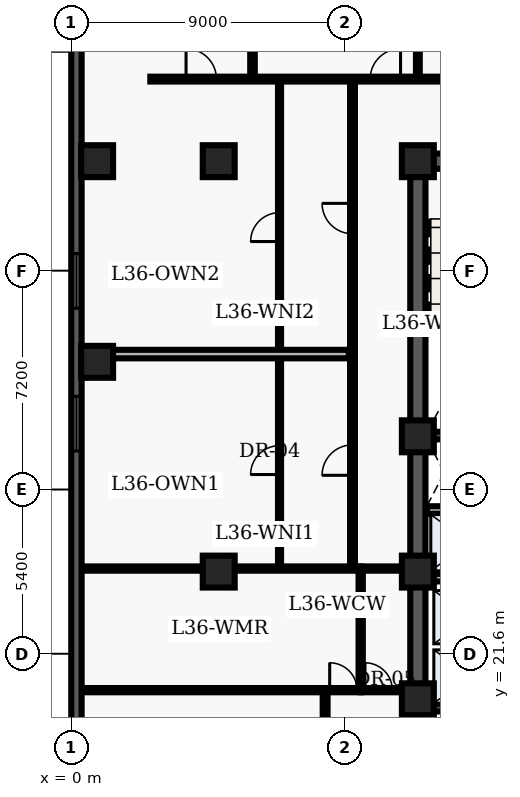
"""IFC4 building model, lengths in metres.
Left out: names, types, materials, properties, quantities, classifications, styles, units other than length and angle.
Written with IfcOpenShell. Run it as: python <this file> out.ifc"""

import sys

from ifc_helpers import new_model, entity, si_unit, converted_unit, direction, frame, origin_with_axes, origin_2d_with_axis, place, context, subcontext, project, spatial, polyline, rectangle, outline, extrude, element, fill, save


model = new_model("IFC4")
c1 = context("Model", 3, precision=1e-05, world=origin_with_axes(), true_north=direction((0.0, 1.0)))
c2 = subcontext(c1, "Body", "Model", "MODEL_VIEW")
j1 = project(units=[si_unit("LENGTHUNIT", "METRE"), converted_unit("PLANEANGLEUNIT", "DEGREE", entity("IfcPlaneAngleMeasure", 0.017), si_unit("PLANEANGLEUNIT", "RADIAN"), dimensions=[0, 0, 0, 0, 0, 0, 0])], contexts=[c1])
p1 = place(None, origin_with_axes())
s1 = spatial("IfcSite", under=j1, at=p1, CompositionType="ELEMENT")
p2 = place(p1, origin_with_axes())
s2 = spatial("IfcBuilding", under=s1, at=p2, CompositionType="ELEMENT")
p3 = place(p2, frame((0.0, 0.0, 148.5), z_axis=(0.0, 0.0, 1.0), x_axis=(1.0, 0.0, 0.0)))
s3 = spatial("IfcBuildingStorey", under=s2, at=p3, CompositionType="ELEMENT", Elevation=148.5)
p4 = place(p3, frame((11.4, 10.8, 0.0), z_axis=(0.0, 0.0, 1.0), x_axis=(0.0, 1.0, 0.0)))
e1 = element("IfcWall", 1, at=p4, inside=s3, PredefinedType="SHEAR", context=c2, shape_type="SweptSolid", body=[
    extrude(outline(polyline([(0.0, -0.25), (27.0, -0.25), (27.0, 0.25), (0.0, 0.25), (0.0, -0.25)])), origin_with_axes(), (0.0, 0.0, 1.0), 3.66),
])
p5 = place(p3, frame((11.4, 37.8, 0.0), z_axis=(0.0, 0.0, 1.0), x_axis=(1.0, 0.0, 0.0)))
e2 = element("IfcWall", 2, at=p5, inside=s3, PredefinedType="SHEAR", context=c2, shape_type="SweptSolid", body=[
    extrude(outline(polyline([(0.0, -0.25), (7.2, -0.25), (7.2, 0.25), (0.0, 0.25), (0.0, -0.25)])), origin_with_axes(), (0.0, 0.0, 1.0), 3.66),
])
p6 = place(p5, frame((2.625, 0.0, 0.0), z_axis=(0.0, 0.0, 1.0), x_axis=(1.0, 0.0, 0.0)))
e3 = element("IfcOpeningElement", 3, at=p6, cuts=e2, PredefinedType="OPENING", context=c2, shape_type="SweptSolid", body=[
    extrude(rectangle(XDim=1.05, YDim=0.52, at=origin_2d_with_axis()), origin_with_axes(), (0.0, 0.0, 1.0), 2.15),
])
for number, where, z_axis, x_axis in (
    (4, (11.65, 19.825, 0.0), (0.0, 0.0, 1.0), (1.0, 0.0, 0.0)),
    (5, (11.65, 28.775, 0.0), (0.0, 0.0, 1.0), (1.0, 0.0, 0.0)),
):
    element("IfcWall", number, at=place(p3, frame(where, z_axis=z_axis, x_axis=x_axis)), inside=s3, PredefinedType="SHEAR", context=c2, shape_type="SweptSolid", body=[
        extrude(outline(polyline([(0.0, -0.125), (6.7, -0.125), (6.7, 0.125), (0.0, 0.125), (0.0, -0.125)])), origin_with_axes(), (0.0, 0.0, 1.0), 3.66),
    ])
p7 = place(p3, frame((11.7, 24.1, 0.0), z_axis=(0.0, 0.0, 1.0), x_axis=(1.0, 0.0, 0.0)))
e6 = element("IfcWall", 6, at=p7, inside=s3, PredefinedType="SOLIDWALL", context=c2, shape_type="SweptSolid", body=[
    extrude(outline(polyline([(0.0, -0.125), (6.6, -0.125), (6.6, 0.125), (0.0, 0.125), (0.0, -0.125)])), origin_with_axes(), (0.0, 0.0, 1.0), 2.7),
])
p8 = place(p7, frame((3.75, 0.0, 0.0), z_axis=(0.0, 0.0, 1.0), x_axis=(1.0, 0.0, 0.0)))
e7 = element("IfcOpeningElement", 7, at=p8, cuts=e6, PredefinedType="OPENING", context=c2, shape_type="SweptSolid", body=[
    extrude(rectangle(XDim=0.9, YDim=0.27, at=origin_2d_with_axis()), origin_with_axes(), (0.0, 0.0, 1.0), 2.15),
])
p9 = place(p3, frame((11.7, 26.325, 0.0), z_axis=(0.0, 0.0, 1.0), x_axis=(1.0, 0.0, 0.0)))
e8 = element("IfcWall", 8, at=p9, inside=s3, PredefinedType="SOLIDWALL", context=c2, shape_type="SweptSolid", body=[
    extrude(outline(polyline([(0.0, -0.125), (6.6, -0.125), (6.6, 0.125), (0.0, 0.125), (0.0, -0.125)])), origin_with_axes(), (0.0, 0.0, 1.0), 2.7),
])
p10 = place(p9, frame((3.5, 0.0, 0.0), z_axis=(0.0, 0.0, 1.0), x_axis=(1.0, 0.0, 0.0)))
e9 = element("IfcOpeningElement", 9, at=p10, cuts=e8, PredefinedType="OPENING", context=c2, shape_type="SweptSolid", body=[
    extrude(rectangle(XDim=0.9, YDim=0.27, at=origin_2d_with_axis()), origin_with_axes(), (0.0, 0.0, 1.0), 2.15),
])
for number, where, z_axis, x_axis in (
    (10, (11.4, 20.1, 0.0), (0.0, 0.0, 1.0), (1.0, 0.0, 0.0)),
    (11, (11.4, 24.3, 0.0), (0.0, 0.0, 1.0), (1.0, 0.0, 0.0)),
    (12, (11.4, 28.75, 0.0), (0.0, 0.0, 1.0), (1.0, 0.0, 0.0)),
    (13, (11.4, 37.8, 0.0), (0.0, 0.0, 1.0), (1.0, 0.0, 0.0)),
    (14, (4.85, 24.3, 0.0), (0.0, 0.0, 1.0), (1.0, 0.0, 0.0)),
    (15, (4.85, 37.8, 0.0), (0.0, 0.0, 1.0), (1.0, 0.0, 0.0)),
    (16, (0.85, 31.2, 0.0), (0.0, 0.0, 1.0), (1.0, 0.0, 0.0)),
    (17, (0.85, 37.8, 0.0), (0.0, 0.0, 1.0), (1.0, 0.0, 0.0)),
):
    element("IfcColumn", number, at=place(p3, frame(where, z_axis=z_axis, x_axis=x_axis)), inside=s3, PredefinedType="COLUMN", context=c2, shape_type="SweptSolid", body=[
        extrude(rectangle(XDim=1.05, YDim=1.05, at=origin_2d_with_axis()), origin_with_axes(), (0.0, 0.0, 1.0), 3.9),
    ])
p11 = place(p3, frame((9.52, 20.4, 0.0), z_axis=(0.0, 0.0, 1.0), x_axis=(0.0, 1.0, 0.0)))
e18 = element("IfcWall", 18, at=p11, inside=s3, PredefinedType="PARTITIONING", context=c2, shape_type="SweptSolid", body=[
    extrude(outline(polyline([(0.0, -0.07), (4.0, -0.07), (4.0, 0.07), (0.0, 0.07), (0.0, -0.07)])), origin_with_axes(), (0.0, 0.0, 1.0), 2.7),
])
p12 = place(p3, frame((9.52, 20.4, 0.0), z_axis=(0.0, 0.0, 1.0), x_axis=(1.0, 0.0, 0.0)))
e19 = element("IfcWall", 19, at=p12, inside=s3, PredefinedType="PARTITIONING", context=c2, shape_type="SweptSolid", body=[
    extrude(outline(polyline([(0.0, -0.07), (1.58, -0.07), (1.58, 0.07), (0.0, 0.07), (0.0, -0.07)])), origin_with_axes(), (0.0, 0.0, 1.0), 2.7),
])
p13 = place(p12, frame((0.59, 0.0, 0.0), z_axis=(0.0, 0.0, 1.0), x_axis=(1.0, 0.0, 0.0)))
e20 = element("IfcOpeningElement", 20, at=p13, cuts=e19, PredefinedType="OPENING", context=c2, shape_type="SweptSolid", body=[
    extrude(rectangle(XDim=0.9, YDim=0.16, at=origin_2d_with_axis()), origin_with_axes(), (0.0, 0.0, 1.0), 2.15),
])
p14 = place(p3, frame((9.52, 24.4, 0.0), z_axis=(0.0, 0.0, 1.0), x_axis=(1.0, 0.0, 0.0)))
e21 = element("IfcWall", 21, at=p14, inside=s3, PredefinedType="PARTITIONING", context=c2, shape_type="SweptSolid", body=[
    extrude(outline(polyline([(0.0, -0.07), (1.58, -0.07), (1.58, 0.07), (0.0, 0.07), (0.0, -0.07)])), origin_with_axes(), (0.0, 0.0, 1.0), 2.7),
])
p15 = place(p3, frame((2.6, 40.5, 0.0), z_axis=(0.0, 0.0, 1.0), x_axis=(1.0, 0.0, 0.0)))
e22 = element("IfcWall", 22, at=p15, inside=s3, PredefinedType="PARTITIONING", context=c2, shape_type="SweptSolid", body=[
    extrude(outline(polyline([(0.0, -0.08), (19.506, -0.08), (19.506, 0.08), (0.0, 0.08), (0.0, -0.08)])), origin_with_axes(), (0.0, 0.0, 1.0), 2.7),
])
p16 = place(p15, frame((1.675, 0.0, 0.0), z_axis=(0.0, 0.0, 1.0), x_axis=(1.0, 0.0, 0.0)))
e23 = element("IfcOpeningElement", 23, at=p16, cuts=e22, PredefinedType="OPENING", context=c2, shape_type="SweptSolid", body=[
    extrude(rectangle(XDim=1.0, YDim=0.18, at=origin_2d_with_axis()), origin_with_axes(), (0.0, 0.0, 1.0), 2.15),
])
p17 = place(p15, frame((7.731, 0.0, 0.0), z_axis=(0.0, 0.0, 1.0), x_axis=(1.0, 0.0, 0.0)))
e24 = element("IfcOpeningElement", 24, at=p17, cuts=e22, PredefinedType="OPENING", context=c2, shape_type="SweptSolid", body=[
    extrude(rectangle(XDim=1.0, YDim=0.18, at=origin_2d_with_axis()), origin_with_axes(), (0.0, 0.0, 1.0), 2.15),
])
p18 = place(p15, frame((10.722, 0.0, 0.0), z_axis=(0.0, 0.0, 1.0), x_axis=(1.0, 0.0, 0.0)))
e25 = element("IfcOpeningElement", 25, at=p18, cuts=e22, PredefinedType="OPENING", context=c2, shape_type="SweptSolid", body=[
    extrude(rectangle(XDim=1.0, YDim=0.18, at=origin_2d_with_axis()), origin_with_axes(), (0.0, 0.0, 1.0), 2.15),
])
p19 = place(p15, frame((13.851, 0.0, 0.0), z_axis=(0.0, 0.0, 1.0), x_axis=(1.0, 0.0, 0.0)))
e26 = element("IfcOpeningElement", 26, at=p19, cuts=e22, PredefinedType="OPENING", context=c2, shape_type="SweptSolid", body=[
    extrude(rectangle(XDim=1.0, YDim=0.18, at=origin_2d_with_axis()), origin_with_axes(), (0.0, 0.0, 1.0), 2.15),
])
p20 = place(p3, frame((8.35, 7.8, 0.0), z_axis=(0.0, 0.0, 1.0), x_axis=(0.0, 1.0, 0.0)))
e27 = element("IfcWall", 27, at=p20, inside=s3, PredefinedType="PARTITIONING", context=c2, shape_type="SweptSolid", body=[
    extrude(outline(polyline([(0.0, -0.08), (12.6, -0.08), (12.6, 0.08), (0.0, 0.08), (0.0, -0.08)])), origin_with_axes(), (0.0, 0.0, 1.0), 2.7),
])
p21 = place(p20, frame((2.893, 0.0, 0.0), z_axis=(0.0, 0.0, 1.0), x_axis=(1.0, 0.0, 0.0)))
e28 = element("IfcOpeningElement", 28, at=p21, cuts=e27, PredefinedType="OPENING", context=c2, shape_type="SweptSolid", body=[
    extrude(rectangle(XDim=1.0, YDim=0.18, at=origin_2d_with_axis()), origin_with_axes(), (0.0, 0.0, 1.0), 2.15),
])
p22 = place(p20, frame((9.088, 0.0, 0.0), z_axis=(0.0, 0.0, 1.0), x_axis=(1.0, 0.0, 0.0)))
e29 = element("IfcOpeningElement", 29, at=p22, cuts=e27, PredefinedType="OPENING", context=c2, shape_type="SweptSolid", body=[
    extrude(rectangle(XDim=1.0, YDim=0.18, at=origin_2d_with_axis()), origin_with_axes(), (0.0, 0.0, 1.0), 2.15),
])
p23 = place(p3, frame((9.25, 24.4, 0.0), z_axis=(0.0, 0.0, 1.0), x_axis=(0.0, 1.0, 0.0)))
e30 = element("IfcWall", 30, at=p23, inside=s3, PredefinedType="PARTITIONING", context=c2, shape_type="SweptSolid", body=[
    extrude(outline(polyline([(0.0, -0.08), (16.1, -0.08), (16.1, 0.08), (0.0, 0.08), (0.0, -0.08)])), origin_with_axes(), (0.0, 0.0, 1.0), 2.7),
])
p24 = place(p23, frame((3.567, 0.0, 0.0), z_axis=(0.0, 0.0, 1.0), x_axis=(1.0, 0.0, 0.0)))
e31 = element("IfcOpeningElement", 31, at=p24, cuts=e30, PredefinedType="OPENING", context=c2, shape_type="SweptSolid", body=[
    extrude(rectangle(XDim=1.0, YDim=0.18, at=origin_2d_with_axis()), origin_with_axes(), (0.0, 0.0, 1.0), 2.15),
])
p25 = place(p23, frame((11.512, 0.0, 0.0), z_axis=(0.0, 0.0, 1.0), x_axis=(1.0, 0.0, 0.0)))
e32 = element("IfcOpeningElement", 32, at=p25, cuts=e30, PredefinedType="OPENING", context=c2, shape_type="SweptSolid", body=[
    extrude(rectangle(XDim=1.0, YDim=0.18, at=origin_2d_with_axis()), origin_with_axes(), (0.0, 0.0, 1.0), 2.15),
])
p26 = place(p3, frame((0.335, 20.4, 0.0), z_axis=(0.0, 0.0, 1.0), x_axis=(1.0, 0.0, 0.0)))
e33 = element("IfcWall", 33, at=p26, inside=s3, PredefinedType="PARTITIONING", context=c2, shape_type="SweptSolid", body=[
    extrude(outline(polyline([(0.0, -0.07), (9.185, -0.07), (9.185, 0.07), (0.0, 0.07), (0.0, -0.07)])), origin_with_axes(), (0.0, 0.0, 1.0), 2.7),
])
p27 = place(p26, frame((8.615, 0.0, 0.0), z_axis=(0.0, 0.0, 1.0), x_axis=(1.0, 0.0, 0.0)))
e34 = element("IfcOpeningElement", 34, at=p27, cuts=e33, PredefinedType="OPENING", context=c2, shape_type="SweptSolid", body=[
    extrude(rectangle(XDim=0.9, YDim=0.16, at=origin_2d_with_axis()), origin_with_axes(), (0.0, 0.0, 1.0), 2.15),
])
p28 = place(p3, frame((0.335, 24.4, 0.0), z_axis=(0.0, 0.0, 1.0), x_axis=(1.0, 0.0, 0.0)))
e35 = element("IfcWall", 35, at=p28, inside=s3, PredefinedType="PARTITIONING", context=c2, shape_type="SweptSolid", body=[
    extrude(outline(polyline([(0.0, -0.07), (9.185, -0.07), (9.185, 0.07), (0.0, 0.07), (0.0, -0.07)])), origin_with_axes(), (0.0, 0.0, 1.0), 2.7),
])
p29 = place(p3, frame((6.85, 24.55, 0.0), z_axis=(0.0, 0.0, 1.0), x_axis=(0.0, 1.0, 0.0)))
e36 = element("IfcWall", 36, at=p29, inside=s3, PredefinedType="PARTITIONING", context=c2, shape_type="SweptSolid", body=[
    extrude(outline(polyline([(0.0, -0.05), (15.75, -0.05), (15.75, 0.05), (0.0, 0.05), (0.0, -0.05)])), origin_with_axes(), (0.0, 0.0, 1.0), 2.7),
])
p30 = place(p29, frame((3.417, 0.0, 0.0), z_axis=(0.0, 0.0, 1.0), x_axis=(1.0, 0.0, 0.0)))
e37 = element("IfcOpeningElement", 37, at=p30, cuts=e36, PredefinedType="OPENING", context=c2, shape_type="SweptSolid", body=[
    extrude(rectangle(XDim=0.95, YDim=0.12, at=origin_2d_with_axis()), origin_with_axes(), (0.0, 0.0, 1.0), 2.15),
])
p31 = place(p29, frame((11.082, 0.0, 0.0), z_axis=(0.0, 0.0, 1.0), x_axis=(1.0, 0.0, 0.0)))
e38 = element("IfcOpeningElement", 38, at=p31, cuts=e36, PredefinedType="OPENING", context=c2, shape_type="SweptSolid", body=[
    extrude(rectangle(XDim=0.95, YDim=0.12, at=origin_2d_with_axis()), origin_with_axes(), (0.0, 0.0, 1.0), 2.15),
])
p32 = place(p3, frame((0.335, 31.455, 0.0), z_axis=(0.0, 0.0, 1.0), x_axis=(1.0, 0.0, 0.0)))
e39 = element("IfcWall", 39, at=p32, inside=s3, PredefinedType="PARTITIONING", context=c2, shape_type="SweptSolid", body=[
    extrude(outline(polyline([(0.0, -0.14), (8.795, -0.14), (8.795, 0.14), (0.0, 0.14), (0.0, -0.14)])), origin_with_axes(), (0.0, 0.0, 1.0), 2.7),
])
p33 = place(p3, frame((5.961, 40.6, 0.0), z_axis=(0.0, 0.0, 1.0), x_axis=(0.0, 1.0, 0.0)))
e40 = element("IfcWall", 40, at=p33, inside=s3, PredefinedType="PARTITIONING", context=c2, shape_type="SweptSolid", body=[
    extrude(outline(polyline([(0.0, -0.075), (7.665, -0.075), (7.665, 0.075), (0.0, 0.075), (0.0, -0.075)])), origin_with_axes(), (0.0, 0.0, 1.0), 2.7),
])
p34 = place(p3, frame((11.4, 40.6, 0.0), z_axis=(0.0, 0.0, 1.0), x_axis=(0.0, 1.0, 0.0)))
e41 = element("IfcWall", 41, at=p34, inside=s3, PredefinedType="PARTITIONING", context=c2, shape_type="SweptSolid", body=[
    extrude(outline(polyline([(0.0, -0.062), (7.665, -0.062), (7.665, 0.062), (0.0, 0.062), (0.0, -0.062)])), origin_with_axes(), (0.0, 0.0, 1.0), 2.7),
])
p35 = place(p3, frame((0.17, 2.74, 0.0), z_axis=(0.0, 0.0, 1.0), x_axis=(0.0, 1.0, 0.0)))
e42 = element("IfcWall", 42, at=p35, inside=s3, PredefinedType="SOLIDWALL", context=c2, shape_type="SweptSolid", body=[
    extrude(outline(polyline([(0.0, -0.17), (43.46, -0.17), (43.46, 0.17), (0.0, 0.17), (0.0, -0.17)])), origin_with_axes(), (0.0, 0.0, 1.0), 3.66),
])
p36 = place(p35, frame((2.948, 0.0, 0.45), z_axis=(0.0, 0.0, 1.0), x_axis=(1.0, 0.0, 0.0)))
e43 = element("IfcOpeningElement", 43, at=p36, cuts=e42, PredefinedType="OPENING", context=c2, shape_type="SweptSolid", body=[
    extrude(rectangle(XDim=1.8, YDim=0.36, at=origin_2d_with_axis()), origin_with_axes(), (0.0, 0.0, 1.0), 2.1),
])
p37 = place(p35, frame((12.339, 0.0, 0.45), z_axis=(0.0, 0.0, 1.0), x_axis=(1.0, 0.0, 0.0)))
e44 = element("IfcOpeningElement", 44, at=p37, cuts=e42, PredefinedType="OPENING", context=c2, shape_type="SweptSolid", body=[
    extrude(rectangle(XDim=1.8, YDim=0.36, at=origin_2d_with_axis()), origin_with_axes(), (0.0, 0.0, 1.0), 2.1),
])
p38 = place(p35, frame((26.426, 0.0, 0.45), z_axis=(0.0, 0.0, 1.0), x_axis=(1.0, 0.0, 0.0)))
e45 = element("IfcOpeningElement", 45, at=p38, cuts=e42, PredefinedType="OPENING", context=c2, shape_type="SweptSolid", body=[
    extrude(rectangle(XDim=1.8, YDim=0.36, at=origin_2d_with_axis()), origin_with_axes(), (0.0, 0.0, 1.0), 2.1),
])
p39 = place(p35, frame((31.121, 0.0, 0.45), z_axis=(0.0, 0.0, 1.0), x_axis=(1.0, 0.0, 0.0)))
e46 = element("IfcOpeningElement", 46, at=p39, cuts=e42, PredefinedType="OPENING", context=c2, shape_type="SweptSolid", body=[
    extrude(rectangle(XDim=1.8, YDim=0.36, at=origin_2d_with_axis()), origin_with_axes(), (0.0, 0.0, 1.0), 2.1),
])
p40 = place(p35, frame((40.062, 0.0, 0.45), z_axis=(0.0, 0.0, 1.0), x_axis=(1.0, 0.0, 0.0)))
e47 = element("IfcOpeningElement", 47, at=p40, cuts=e42, PredefinedType="OPENING", context=c2, shape_type="SweptSolid", body=[
    extrude(rectangle(XDim=1.8, YDim=0.36, at=origin_2d_with_axis()), origin_with_axes(), (0.0, 0.0, 1.0), 2.1),
])
p41 = place(p12, frame((0.59, 0.0, 0.0), z_axis=(0.0, 0.0, 1.0), x_axis=(1.0, 0.0, 0.0)))
e48 = element("IfcDoor", 48, at=p41, inside=s3, OperationType="SINGLE_SWING_LEFT", PredefinedType="DOOR", context=c2, shape_type="SweptSolid", body=[
    extrude(rectangle(XDim=0.9, YDim=0.084, at=origin_2d_with_axis()), origin_with_axes(), (0.0, 0.0, 1.0), 2.15),
])
fill(e20, e48)
p42 = place(p26, frame((8.615, 0.0, 0.0), z_axis=(0.0, 0.0, 1.0), x_axis=(1.0, 0.0, 0.0)))
e49 = element("IfcDoor", 49, at=p42, inside=s3, OperationType="SINGLE_SWING_LEFT", PredefinedType="DOOR", context=c2, shape_type="SweptSolid", body=[
    extrude(rectangle(XDim=0.9, YDim=0.084, at=origin_2d_with_axis()), origin_with_axes(), (0.0, 0.0, 1.0), 2.15),
])
fill(e34, e49)
p43 = place(p29, frame((3.417, 0.0, 0.0), z_axis=(0.0, 0.0, 1.0), x_axis=(1.0, 0.0, 0.0)))
e50 = element("IfcDoor", 50, at=p43, inside=s3, OperationType="SINGLE_SWING_LEFT", PredefinedType="DOOR", context=c2, shape_type="SweptSolid", body=[
    extrude(rectangle(XDim=0.95, YDim=0.06, at=origin_2d_with_axis()), origin_with_axes(), (0.0, 0.0, 1.0), 2.15),
])
fill(e37, e50)
p44 = place(p23, frame((3.567, 0.0, 0.0), z_axis=(0.0, 0.0, 1.0), x_axis=(1.0, 0.0, 0.0)))
e51 = element("IfcDoor", 51, at=p44, inside=s3, OperationType="SINGLE_SWING_LEFT", PredefinedType="DOOR", context=c2, shape_type="SweptSolid", body=[
    extrude(rectangle(XDim=1.0, YDim=0.09, at=origin_2d_with_axis()), origin_with_axes(), (0.0, 0.0, 1.0), 2.15),
])
fill(e31, e51)
p45 = place(p29, frame((11.082, 0.0, 0.0), z_axis=(0.0, 0.0, 1.0), x_axis=(1.0, 0.0, 0.0)))
e52 = element("IfcDoor", 52, at=p45, inside=s3, OperationType="SINGLE_SWING_LEFT", PredefinedType="DOOR", context=c2, shape_type="SweptSolid", body=[
    extrude(rectangle(XDim=0.95, YDim=0.06, at=origin_2d_with_axis()), origin_with_axes(), (0.0, 0.0, 1.0), 2.15),
])
fill(e38, e52)
p46 = place(p23, frame((11.512, 0.0, 0.0), z_axis=(0.0, 0.0, 1.0), x_axis=(1.0, 0.0, 0.0)))
e53 = element("IfcDoor", 53, at=p46, inside=s3, OperationType="SINGLE_SWING_RIGHT", PredefinedType="DOOR", context=c2, shape_type="SweptSolid", body=[
    extrude(rectangle(XDim=1.0, YDim=0.09, at=origin_2d_with_axis()), origin_with_axes(), (0.0, 0.0, 1.0), 2.15),
])
fill(e32, e53)
p47 = place(p15, frame((1.675, 0.0, 0.0), z_axis=(0.0, 0.0, 1.0), x_axis=(1.0, 0.0, 0.0)))
e54 = element("IfcDoor", 54, at=p47, inside=s3, OperationType="SINGLE_SWING_LEFT", PredefinedType="DOOR", context=c2, shape_type="SweptSolid", body=[
    extrude(rectangle(XDim=1.0, YDim=0.09, at=origin_2d_with_axis()), origin_with_axes(), (0.0, 0.0, 1.0), 2.15),
])
fill(e23, e54)
p48 = place(p15, frame((7.731, 0.0, 0.0), z_axis=(0.0, 0.0, 1.0), x_axis=(1.0, 0.0, 0.0)))
e55 = element("IfcDoor", 55, at=p48, inside=s3, OperationType="SINGLE_SWING_RIGHT", PredefinedType="DOOR", context=c2, shape_type="SweptSolid", body=[
    extrude(rectangle(XDim=1.0, YDim=0.09, at=origin_2d_with_axis()), origin_with_axes(), (0.0, 0.0, 1.0), 2.15),
])
fill(e24, e55)
p49 = place(p35, frame((26.426, 0.0, 0.45), z_axis=(0.0, 0.0, 1.0), x_axis=(1.0, 0.0, 0.0)))
e56 = element("IfcWindow", 56, at=p49, inside=s3, PredefinedType="WINDOW", context=c2, shape_type="SweptSolid", body=[
    extrude(rectangle(XDim=1.8, YDim=0.09, at=origin_2d_with_axis()), origin_with_axes(), (0.0, 0.0, 1.0), 2.1),
])
fill(e45, e56)
p50 = place(p35, frame((31.121, 0.0, 0.45), z_axis=(0.0, 0.0, 1.0), x_axis=(1.0, 0.0, 0.0)))
e57 = element("IfcWindow", 57, at=p50, inside=s3, PredefinedType="WINDOW", context=c2, shape_type="SweptSolid", body=[
    extrude(rectangle(XDim=1.8, YDim=0.09, at=origin_2d_with_axis()), origin_with_axes(), (0.0, 0.0, 1.0), 2.1),
])
fill(e46, e57)
save(model, sys.argv[1])
